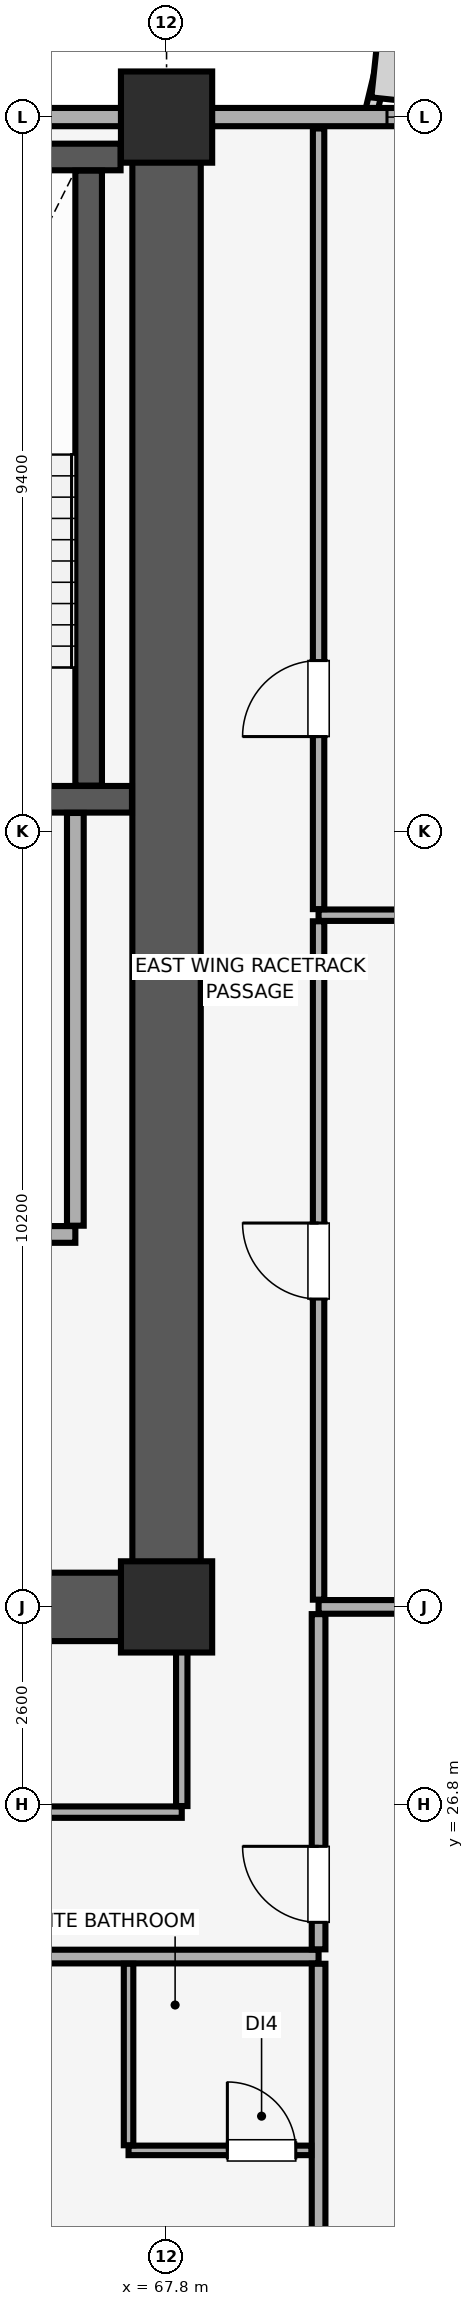
"""IFC4 building model, lengths in metres.
Left out: names, types, materials, properties, quantities, classifications, styles, units other than length and angle.
Written with IfcOpenShell. Run it as: python <this file> out.ifc"""

import sys

from ifc_helpers import new_model, si_unit, direction, frame, frame_2d, origin, origin_2d, place, context, subcontext, project, spatial, rectangle, extrude, element, fill, save


model = new_model("IFC4")
c1 = context("Model", 3, precision=1e-05, world=origin(), true_north=direction((0.0, 1.0)))
c2 = subcontext(c1, "Body", "Model", "MODEL_VIEW")
j1 = project(units=[si_unit("LENGTHUNIT", "METRE"), si_unit("PLANEANGLEUNIT", "RADIAN")], contexts=[c1])
p1 = place(None, origin())
s1 = spatial("IfcSite", under=j1, at=p1, CompositionType="ELEMENT")
p2 = place(p1, origin())
s2 = spatial("IfcBuilding", under=s1, at=p2, CompositionType="ELEMENT")
p3 = place(p2, frame((0.0, 0.0, 220.55)))
s3 = spatial("IfcBuildingStorey", under=s2, at=p3, CompositionType="ELEMENT", Elevation=220.55)
for number, where, z_axis, x_axis in (
    (1, (67.8, 29.4, 0.0), (0.0, 0.0, 1.0), (1.0, 0.0, 0.0)),
    (2, (67.8, 49.0, 0.0), (0.0, 0.0, 1.0), (1.0, 0.0, 0.0)),
):
    element("IfcColumn", number, at=place(p3, frame(where, z_axis=z_axis, x_axis=x_axis)), inside=s3, PredefinedType="COLUMN", context=c2, shape_type="SweptSolid", body=[
        extrude(rectangle(XDim=1.2, YDim=1.2, at=origin_2d()), origin(), (0.0, 0.0, 1.0), 3.56),
    ])
p4 = place(p3, frame((77.0, 49.0, 0.0), z_axis=(0.0, 0.0, 1.0), x_axis=(-1.0, 0.0, 0.0)))
e3 = element("IfcWall", 3, at=p4, inside=s3, PredefinedType="SOLIDWALL", context=c2, shape_type="SweptSolid", body=[
    extrude(rectangle(XDim=70.0, YDim=0.24, at=frame_2d((35.0, 0.0))), origin(), (0.0, 0.0, 1.0), 2.76),
])
p5 = place(p4, frame((63.7, 0.0, 0.85)))
e4 = element("IfcOpeningElement", 4, at=p5, cuts=e3, PredefinedType="OPENING", context=c2, shape_type="SweptSolid", body=[
    extrude(rectangle(XDim=3.0, YDim=1.5, at=frame_2d((1.5, 0.75))), frame((0.0, 0.13, 0.0), z_axis=(0.0, -1.0, 0.0), x_axis=(1.0, 0.0, 0.0)), (0.0, 0.0, 1.0), 0.26),
])
p6 = place(p4, frame((3.3, 0.0, 0.85)))
e5 = element("IfcOpeningElement", 5, at=p6, cuts=e3, PredefinedType="OPENING", context=c2, shape_type="SweptSolid", body=[
    extrude(rectangle(XDim=3.0, YDim=1.5, at=frame_2d((1.5, 0.75))), frame((0.0, 0.13, 0.0), z_axis=(0.0, -1.0, 0.0), x_axis=(1.0, 0.0, 0.0)), (0.0, 0.0, 1.0), 0.26),
])
p7 = place(p4, frame((49.465, 0.0, 0.9)))
e6 = element("IfcOpeningElement", 6, at=p7, cuts=e3, PredefinedType="OPENING", context=c2, shape_type="SweptSolid", body=[
    extrude(rectangle(XDim=1.5, YDim=1.4, at=frame_2d((0.75, 0.7))), frame((0.0, 0.13, 0.0), z_axis=(0.0, -1.0, 0.0), x_axis=(1.0, 0.0, 0.0)), (0.0, 0.0, 1.0), 0.26),
])
p8 = place(p4, frame((41.65, 0.0, 0.9)))
e7 = element("IfcOpeningElement", 7, at=p8, cuts=e3, PredefinedType="OPENING", context=c2, shape_type="SweptSolid", body=[
    extrude(rectangle(XDim=3.6, YDim=1.5, at=frame_2d((1.8, 0.75))), frame((0.0, 0.13, 0.0), z_axis=(0.0, -1.0, 0.0), x_axis=(1.0, 0.0, 0.0)), (0.0, 0.0, 1.0), 0.26),
])
p9 = place(p4, frame((28.25, 0.0, 0.9)))
e8 = element("IfcOpeningElement", 8, at=p9, cuts=e3, PredefinedType="OPENING", context=c2, shape_type="SweptSolid", body=[
    extrude(rectangle(XDim=1.5, YDim=1.4, at=frame_2d((0.75, 0.7))), frame((0.0, 0.13, 0.0), z_axis=(0.0, -1.0, 0.0), x_axis=(1.0, 0.0, 0.0)), (0.0, 0.0, 1.0), 0.26),
])
p10 = place(p4, frame((24.6, 0.0, 0.9)))
e9 = element("IfcOpeningElement", 9, at=p10, cuts=e3, PredefinedType="OPENING", context=c2, shape_type="SweptSolid", body=[
    extrude(rectangle(XDim=2.4, YDim=1.5, at=frame_2d((1.2, 0.75))), frame((0.0, 0.13, 0.0), z_axis=(0.0, -1.0, 0.0), x_axis=(1.0, 0.0, 0.0)), (0.0, 0.0, 1.0), 0.26),
])
p11 = place(p4, frame((20.235, 0.0, 0.9)))
e10 = element("IfcOpeningElement", 10, at=p11, cuts=e3, PredefinedType="OPENING", context=c2, shape_type="SweptSolid", body=[
    extrude(rectangle(XDim=2.4, YDim=1.5, at=frame_2d((1.2, 0.75))), frame((0.0, 0.13, 0.0), z_axis=(0.0, -1.0, 0.0), x_axis=(1.0, 0.0, 0.0)), (0.0, 0.0, 1.0), 0.26),
])
p12 = place(p3, frame((67.8, 29.4, 0.0), z_axis=(0.0, 0.0, 1.0), x_axis=(0.0, 1.0, 0.0)))
e11 = element("IfcWall", 11, at=p12, inside=s3, PredefinedType="SHEAR", context=c2, shape_type="SweptSolid", body=[
    extrude(rectangle(XDim=19.2, YDim=0.9, at=frame_2d((9.6, 0.0))), origin(), (0.0, 0.0, 1.0), 3.56),
])
p13 = place(p3, frame((60.4, 29.4, 0.0), z_axis=(0.0, 0.0, 1.0), x_axis=(1.0, 0.0, 0.0)))
e12 = element("IfcWall", 12, at=p13, inside=s3, PredefinedType="SHEAR", context=c2, shape_type="SweptSolid", body=[
    extrude(rectangle(XDim=6.945, YDim=0.9, at=frame_2d((3.473, 0.0))), origin(), (0.0, 0.0, 1.0), 3.56),
])
p14 = place(p3, frame((63.145, 40.025, 0.0), z_axis=(0.0, 0.0, 1.0), x_axis=(1.0, 0.0, 0.0)))
e13 = element("IfcWall", 13, at=p14, inside=s3, PredefinedType="SHEAR", context=c2, shape_type="SweptSolid", body=[
    extrude(rectangle(XDim=4.2, YDim=0.35, at=frame_2d((2.1, 0.0))), origin(), (0.0, 0.0, 1.0), 3.56),
])
p15 = place(p14, frame((1.24, 0.0, 0.0)))
e14 = element("IfcOpeningElement", 14, at=p15, cuts=e13, PredefinedType="OPENING", context=c2, shape_type="SweptSolid", body=[
    extrude(rectangle(XDim=1.15, YDim=2.15, at=frame_2d((0.575, 1.075))), frame((0.0, 0.185, 0.0), z_axis=(0.0, -1.0, 0.0), x_axis=(1.0, 0.0, 0.0)), (0.0, 0.0, 1.0), 0.37),
])
p16 = place(p3, frame((63.145, 48.475, 0.0), z_axis=(0.0, 0.0, 1.0), x_axis=(1.0, 0.0, 0.0)))
e15 = element("IfcWall", 15, at=p16, inside=s3, PredefinedType="SHEAR", context=c2, shape_type="SweptSolid", body=[
    extrude(rectangle(XDim=4.05, YDim=0.35, at=frame_2d((2.025, 0.0))), origin(), (0.0, 0.0, 1.0), 3.56),
])
p17 = place(p3, frame((66.775, 40.205, 0.0), z_axis=(0.0, 0.0, 1.0), x_axis=(0.0, 1.0, 0.0)))
e16 = element("IfcWall", 16, at=p17, inside=s3, PredefinedType="SHEAR", context=c2, shape_type="SweptSolid", body=[
    extrude(rectangle(XDim=8.09, YDim=0.35, at=frame_2d((4.045, 0.0))), origin(), (0.0, 0.0, 1.0), 3.56),
])
p18 = place(p3, frame((60.55, 34.3, 0.0), z_axis=(0.0, 0.0, 1.0), x_axis=(1.0, 0.0, 0.0)))
e17 = element("IfcWall", 17, at=p18, inside=s3, PredefinedType="PARTITIONING", context=c2, shape_type="SweptSolid", body=[
    extrude(rectangle(XDim=6.05, YDim=0.22, at=frame_2d((3.025, 0.0))), origin(), (0.0, 0.0, 1.0), 3.56),
])
p19 = place(p18, frame((2.65, 0.0, 0.0)))
e18 = element("IfcOpeningElement", 18, at=p19, cuts=e17, PredefinedType="OPENING", context=c2, shape_type="SweptSolid", body=[
    extrude(rectangle(XDim=1.2, YDim=2.15, at=frame_2d((0.6, 1.075))), frame((0.0, 0.12, 0.0), z_axis=(0.0, -1.0, 0.0), x_axis=(1.0, 0.0, 0.0)), (0.0, 0.0, 1.0), 0.24),
])
p20 = place(p3, frame((66.6, 34.415, 0.0), z_axis=(0.0, 0.0, 1.0), x_axis=(0.0, 1.0, 0.0)))
e19 = element("IfcWall", 19, at=p20, inside=s3, PredefinedType="PARTITIONING", context=c2, shape_type="SweptSolid", body=[
    extrude(rectangle(XDim=5.43, YDim=0.22, at=frame_2d((2.715, 0.0))), origin(), (0.0, 0.0, 1.0), 3.56),
])
p21 = place(p3, frame((55.995, 24.8, 0.0), z_axis=(0.0, 0.0, 1.0), x_axis=(1.0, 0.0, 0.0)))
e20 = element("IfcWall", 20, at=p21, inside=s3, PredefinedType="PARTITIONING", context=c2, shape_type="SweptSolid", body=[
    extrude(rectangle(XDim=13.805, YDim=0.18, at=frame_2d((6.902, 0.0))), origin(), (0.0, 0.0, 1.0), 3.56),
])
p22 = place(p21, frame((7.395, 0.0, 0.0)))
e21 = element("IfcOpeningElement", 21, at=p22, cuts=e20, PredefinedType="OPENING", context=c2, shape_type="SweptSolid", body=[
    extrude(rectangle(XDim=1.0, YDim=2.15, at=frame_2d((0.5, 1.075))), frame((0.0, 0.1, 0.0), z_axis=(0.0, -1.0, 0.0), x_axis=(1.0, 0.0, 0.0)), (0.0, 0.0, 1.0), 0.2),
])
p23 = place(p3, frame((69.8, 3.15, 0.0), z_axis=(0.0, 0.0, 1.0), x_axis=(0.0, 1.0, 0.0)))
e22 = element("IfcWall", 22, at=p23, inside=s3, PredefinedType="PARTITIONING", context=c2, shape_type="SweptSolid", body=[
    extrude(rectangle(XDim=21.555, YDim=0.18, at=frame_2d((10.778, 0.0))), origin(), (0.0, 0.0, 1.0), 3.56),
])
p24 = place(p3, frame((67.3, 22.25, 0.0), z_axis=(0.0, 0.0, 1.0), x_axis=(1.0, 0.0, 0.0)))
e23 = element("IfcWall", 23, at=p24, inside=s3, PredefinedType="PARTITIONING", context=c2, shape_type="SweptSolid", body=[
    extrude(rectangle(XDim=2.405, YDim=0.125, at=frame_2d((1.203, 0.0))), origin(), (0.0, 0.0, 1.0), 3.56),
])
p25 = place(p24, frame((1.3, 0.0, 0.0)))
e24 = element("IfcOpeningElement", 24, at=p25, cuts=e23, PredefinedType="OPENING", context=c2, shape_type="SweptSolid", body=[
    extrude(rectangle(XDim=0.9, YDim=2.1, at=frame_2d((0.45, 1.05))), frame((0.0, 0.073, 0.0), z_axis=(0.0, -1.0, 0.0), x_axis=(1.0, 0.0, 0.0)), (0.0, 0.0, 1.0), 0.145),
])
p26 = place(p3, frame((67.3, 22.317, 0.0), z_axis=(0.0, 0.0, 1.0), x_axis=(0.0, 1.0, 0.0)))
e25 = element("IfcWall", 25, at=p26, inside=s3, PredefinedType="PARTITIONING", context=c2, shape_type="SweptSolid", body=[
    extrude(rectangle(XDim=2.388, YDim=0.125, at=frame_2d((1.194, 0.0))), origin(), (0.0, 0.0, 1.0), 3.56),
])
p27 = place(p3, frame((69.8, 29.4, 0.0), z_axis=(0.0, 0.0, 1.0), x_axis=(1.0, 0.0, 0.0)))
e26 = element("IfcWall", 26, at=p27, inside=s3, PredefinedType="PARTITIONING", context=c2, shape_type="SweptSolid", body=[
    extrude(rectangle(XDim=11.05, YDim=0.18, at=frame_2d((5.525, 0.0))), origin(), (0.0, 0.0, 1.0), 2.719),
])
p28 = place(p3, frame((69.8, 24.895, 0.0), z_axis=(0.0, 0.0, 1.0), x_axis=(0.0, 1.0, 0.0)))
e27 = element("IfcWall", 27, at=p28, inside=s3, PredefinedType="PARTITIONING", context=c2, shape_type="SweptSolid", body=[
    extrude(rectangle(XDim=4.41, YDim=0.18, at=frame_2d((2.205, 0.0))), origin(), (0.0, 0.0, 1.0), 3.56),
])
p29 = place(p28, frame((0.355, 0.0, 0.0)))
e28 = element("IfcOpeningElement", 28, at=p29, cuts=e27, PredefinedType="OPENING", context=c2, shape_type="SweptSolid", body=[
    extrude(rectangle(XDim=1.0, YDim=2.15, at=frame_2d((0.5, 1.075))), frame((0.0, 0.1, 0.0), z_axis=(0.0, -1.0, 0.0), x_axis=(1.0, 0.0, 0.0)), (0.0, 0.0, 1.0), 0.2),
])
p30 = place(p3, frame((56.08, 26.7, 0.0), z_axis=(0.0, 0.0, 1.0), x_axis=(1.0, 0.0, 0.0)))
e29 = element("IfcWall", 29, at=p30, inside=s3, PredefinedType="PARTITIONING", context=c2, shape_type="SweptSolid", body=[
    extrude(rectangle(XDim=11.92, YDim=0.15, at=frame_2d((5.96, 0.0))), origin(), (0.0, 0.0, 1.0), 3.56),
])
p31 = place(p30, frame((5.42, 0.0, 0.0)))
e30 = element("IfcOpeningElement", 30, at=p31, cuts=e29, PredefinedType="OPENING", context=c2, shape_type="SweptSolid", body=[
    extrude(rectangle(XDim=1.0, YDim=2.15, at=frame_2d((0.5, 1.075))), frame((0.0, 0.085, 0.0), z_axis=(0.0, -1.0, 0.0), x_axis=(1.0, 0.0, 0.0)), (0.0, 0.0, 1.0), 0.17),
])
p32 = place(p3, frame((68.0, 26.78, 0.0), z_axis=(0.0, 0.0, 1.0), x_axis=(0.0, 1.0, 0.0)))
e31 = element("IfcWall", 31, at=p32, inside=s3, PredefinedType="PARTITIONING", context=c2, shape_type="SweptSolid", body=[
    extrude(rectangle(XDim=2.61, YDim=0.15, at=frame_2d((1.305, 0.0))), origin(), (0.0, 0.0, 1.0), 3.06),
])
p33 = place(p3, frame((69.8, 38.5, 0.0), z_axis=(0.0, 0.0, 1.0), x_axis=(1.0, 0.0, 0.0)))
e32 = element("IfcWall", 32, at=p33, inside=s3, PredefinedType="PARTITIONING", context=c2, shape_type="SweptSolid", body=[
    extrude(rectangle(XDim=11.05, YDim=0.15, at=frame_2d((5.525, 0.0))), origin(), (0.0, 0.0, 1.0), 3.56),
])
p34 = place(p3, frame((69.8, 29.495, 0.0), z_axis=(0.0, 0.0, 1.0), x_axis=(0.0, 1.0, 0.0)))
e33 = element("IfcWall", 33, at=p34, inside=s3, PredefinedType="PARTITIONING", context=c2, shape_type="SweptSolid", body=[
    extrude(rectangle(XDim=8.925, YDim=0.15, at=frame_2d((4.462, 0.0))), origin(), (0.0, 0.0, 1.0), 3.56),
])
p35 = place(p34, frame((3.955, 0.0, 0.0)))
e34 = element("IfcOpeningElement", 34, at=p35, cuts=e33, PredefinedType="OPENING", context=c2, shape_type="SweptSolid", body=[
    extrude(rectangle(XDim=1.0, YDim=2.15, at=frame_2d((0.5, 1.075))), frame((0.0, 0.085, 0.0), z_axis=(0.0, -1.0, 0.0), x_axis=(1.0, 0.0, 0.0)), (0.0, 0.0, 1.0), 0.17),
])
p36 = place(p3, frame((69.8, 38.58, 0.0), z_axis=(0.0, 0.0, 1.0), x_axis=(0.0, 1.0, 0.0)))
e35 = element("IfcWall", 35, at=p36, inside=s3, PredefinedType="PARTITIONING", context=c2, shape_type="SweptSolid", body=[
    extrude(rectangle(XDim=10.27, YDim=0.15, at=frame_2d((5.135, 0.0))), origin(), (0.0, 0.0, 1.0), 3.56),
])
p37 = place(p36, frame((2.27, 0.0, 0.0)))
e36 = element("IfcOpeningElement", 36, at=p37, cuts=e35, PredefinedType="OPENING", context=c2, shape_type="SweptSolid", body=[
    extrude(rectangle(XDim=1.0, YDim=2.15, at=frame_2d((0.5, 1.075))), frame((0.0, 0.085, 0.0), z_axis=(0.0, -1.0, 0.0), x_axis=(1.0, 0.0, 0.0)), (0.0, 0.0, 1.0), 0.17),
])
p38 = place(p6, origin())
e37 = element("IfcWindow", 37, at=p38, inside=s3, PartitioningType="SINGLE_PANEL", PredefinedType="WINDOW", context=c2, shape_type="SweptSolid", body=[
    extrude(rectangle(XDim=3.0, YDim=1.5, at=frame_2d((1.5, 0.75))), frame((0.0, 0.03, 0.0), z_axis=(0.0, -1.0, 0.0), x_axis=(1.0, 0.0, 0.0)), (0.0, 0.0, 1.0), 0.06),
])
fill(e5, e37)
p39 = place(p25, origin())
e38 = element("IfcDoor", 38, at=p39, inside=s3, OperationType="SINGLE_SWING_LEFT", PredefinedType="DOOR", context=c2, shape_type="SweptSolid", body=[
    extrude(rectangle(XDim=0.9, YDim=2.1, at=frame_2d((0.45, 1.05))), frame((0.0, 0.025, 0.0), z_axis=(0.0, -1.0, 0.0), x_axis=(1.0, 0.0, 0.0)), (0.0, 0.0, 1.0), 0.05),
])
fill(e24, e38)
p40 = place(p29, origin())
e39 = element("IfcDoor", 39, at=p40, inside=s3, OperationType="SINGLE_SWING_RIGHT", PredefinedType="DOOR", context=c2, shape_type="SweptSolid", body=[
    extrude(rectangle(XDim=1.0, YDim=2.15, at=frame_2d((0.5, 1.075))), frame((0.0, 0.025, 0.0), z_axis=(0.0, -1.0, 0.0), x_axis=(1.0, 0.0, 0.0)), (0.0, 0.0, 1.0), 0.05),
])
fill(e28, e39)
p41 = place(p35, origin())
e40 = element("IfcDoor", 40, at=p41, inside=s3, OperationType="SINGLE_SWING_RIGHT", PredefinedType="DOOR", context=c2, shape_type="SweptSolid", body=[
    extrude(rectangle(XDim=1.0, YDim=2.15, at=frame_2d((0.5, 1.075))), frame((0.0, 0.025, 0.0), z_axis=(0.0, -1.0, 0.0), x_axis=(1.0, 0.0, 0.0)), (0.0, 0.0, 1.0), 0.05),
])
fill(e34, e40)
p42 = place(p37, origin())
e41 = element("IfcDoor", 41, at=p42, inside=s3, OperationType="SINGLE_SWING_LEFT", PredefinedType="DOOR", context=c2, shape_type="SweptSolid", body=[
    extrude(rectangle(XDim=1.0, YDim=2.15, at=frame_2d((0.5, 1.075))), frame((0.0, 0.025, 0.0), z_axis=(0.0, -1.0, 0.0), x_axis=(1.0, 0.0, 0.0)), (0.0, 0.0, 1.0), 0.05),
])
fill(e36, e41)
save(model, sys.argv[1])
